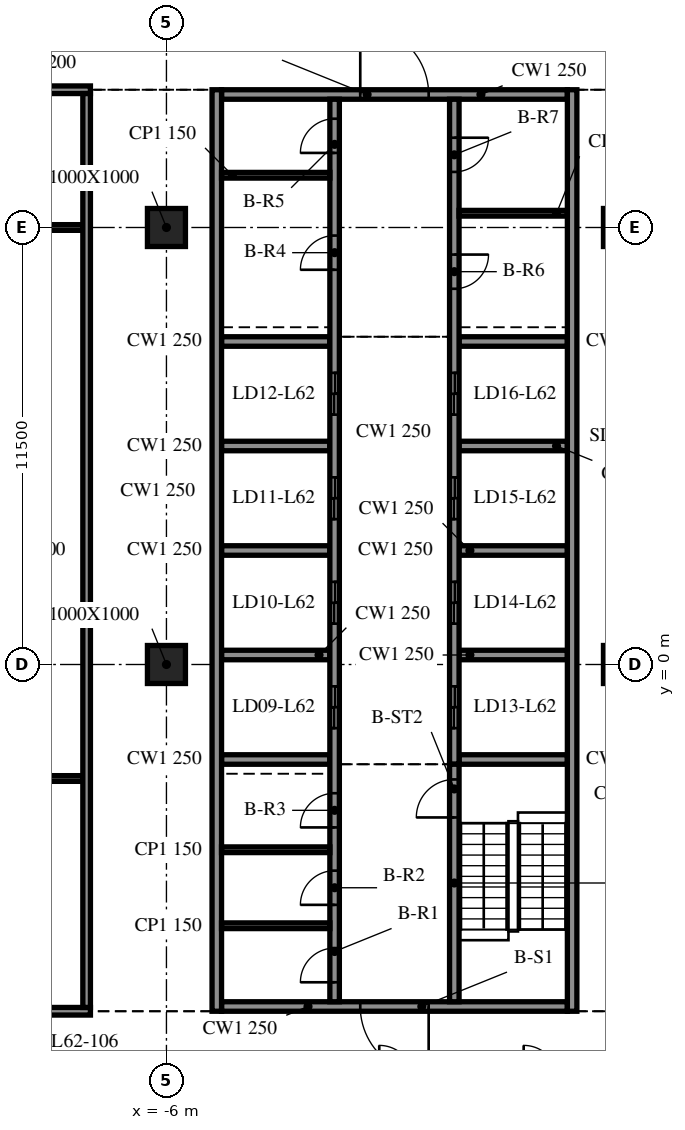
"""IFC4 building model, lengths in metres.
Left out: names, types, materials, properties, quantities, classifications, styles, units other than length and angle.
Written with IfcOpenShell. Run it as: python <this file> out.ifc"""

import sys

from ifc_helpers import new_model, si_unit, direction, frame, frame_2d, origin, origin_2d, place, context, subcontext, project, spatial, rectangle, extrude, element, fill, save


model = new_model("IFC4")
c1 = context("Model", 3, precision=1e-05, world=origin(), true_north=direction((0.0, 1.0)))
c2 = subcontext(c1, "Body", "Model", "MODEL_VIEW")
j1 = project(units=[si_unit("LENGTHUNIT", "METRE"), si_unit("PLANEANGLEUNIT", "RADIAN")], contexts=[c1])
p1 = place(None, origin())
s1 = spatial("IfcSite", under=j1, at=p1, CompositionType="ELEMENT")
p2 = place(p1, origin())
s2 = spatial("IfcBuilding", under=s1, at=p2, CompositionType="ELEMENT")
p3 = place(p2, frame((0.0, 0.0, 255.2)))
s3 = spatial("IfcBuildingStorey", under=s2, at=p3, CompositionType="ELEMENT", Elevation=255.2)
for number, where, z_axis, x_axis in (
    (1, (-6.0, 0.0, -0.34), (0.0, 0.0, 1.0), (1.0, 0.0, 0.0)),
    (2, (-6.0, 11.5, -0.34), (0.0, 0.0, 1.0), (1.0, 0.0, 0.0)),
    (3, (6.0, 0.0, -0.34), (0.0, 0.0, 1.0), (1.0, 0.0, 0.0)),
    (4, (6.0, 11.5, -0.34), (0.0, 0.0, 1.0), (1.0, 0.0, 0.0)),
):
    element("IfcColumn", number, at=place(p3, frame(where, z_axis=z_axis, x_axis=x_axis)), inside=s3, PredefinedType="COLUMN", context=c2, shape_type="SweptSolid", body=[
        extrude(rectangle(XDim=1.0, YDim=1.0, at=origin_2d()), origin(), (0.0, 0.0, 1.0), 3.74),
    ])
for number, where, z_axis, x_axis in (
    (5, (-4.675, 15.125, 0.0), (0.0, 0.0, 1.0), (0.0, -1.0, 0.0)),
    (6, (4.675, -9.125, 0.0), (0.0, 0.0, 1.0), (0.0, 1.0, 0.0)),
):
    element("IfcWall", number, at=place(p3, frame(where, z_axis=z_axis, x_axis=x_axis)), inside=s3, PredefinedType="SOLIDWALL", context=c2, shape_type="SweptSolid", body=[
        extrude(rectangle(XDim=24.25, YDim=0.25, at=frame_2d((12.125, 0.0))), origin(), (0.0, 0.0, 1.0), 3.4),
    ])
p4 = place(p3, frame((4.55, -9.0, 0.0), z_axis=(0.0, 0.0, 1.0), x_axis=(-1.0, 0.0, 0.0)))
e7 = element("IfcWall", 7, at=p4, inside=s3, PredefinedType="SOLIDWALL", context=c2, shape_type="SweptSolid", body=[
    extrude(rectangle(XDim=9.1, YDim=0.25, at=frame_2d((4.55, 0.0))), origin(), (0.0, 0.0, 1.0), 3.4),
])
p5 = place(p4, frame((3.65, 0.0, 0.0)))
e8 = element("IfcOpeningElement", 8, at=p5, cuts=e7, PredefinedType="OPENING", context=c2, shape_type="SweptSolid", body=[
    extrude(rectangle(XDim=1.8, YDim=2.1, at=frame_2d((0.9, 1.05))), frame((0.0, 0.135, 0.0), z_axis=(0.0, -1.0, 0.0), x_axis=(1.0, 0.0, 0.0)), (0.0, 0.0, 1.0), 0.27),
])
p6 = place(p3, frame((-4.55, 15.0, 0.0), z_axis=(0.0, 0.0, 1.0), x_axis=(1.0, 0.0, 0.0)))
e9 = element("IfcWall", 9, at=p6, inside=s3, PredefinedType="SOLIDWALL", context=c2, shape_type="SweptSolid", body=[
    extrude(rectangle(XDim=9.1, YDim=0.25, at=frame_2d((4.55, 0.0))), origin(), (0.0, 0.0, 1.0), 3.4),
])
p7 = place(p6, frame((3.65, 0.0, 0.0)))
e10 = element("IfcOpeningElement", 10, at=p7, cuts=e9, PredefinedType="OPENING", context=c2, shape_type="SweptSolid", body=[
    extrude(rectangle(XDim=1.8, YDim=2.1, at=frame_2d((0.9, 1.05))), frame((0.0, 0.135, 0.0), z_axis=(0.0, -1.0, 0.0), x_axis=(1.0, 0.0, 0.0)), (0.0, 0.0, 1.0), 0.27),
])
p8 = place(p3, frame((-1.575, -8.875, 0.0), z_axis=(0.0, 0.0, 1.0), x_axis=(0.0, 1.0, 0.0)))
e11 = element("IfcWall", 11, at=p8, inside=s3, PredefinedType="SOLIDWALL", context=c2, shape_type="SweptSolid", body=[
    extrude(rectangle(XDim=23.75, YDim=0.25, at=frame_2d((11.875, 0.0))), origin(), (0.0, 0.0, 1.0), 3.4),
])
p9 = place(p8, frame((7.2, 0.0, 0.0)))
e12 = element("IfcOpeningElement", 12, at=p9, cuts=e11, PredefinedType="OPENING", context=c2, shape_type="SweptSolid", body=[
    extrude(rectangle(XDim=1.1, YDim=2.1, at=frame_2d((0.55, 1.05))), frame((0.0, 0.135, 0.0), z_axis=(0.0, -1.0, 0.0), x_axis=(1.0, 0.0, 0.0)), (0.0, 0.0, 1.0), 0.27),
])
p10 = place(p8, frame((9.95, 0.0, 0.0)))
e13 = element("IfcOpeningElement", 13, at=p10, cuts=e11, PredefinedType="OPENING", context=c2, shape_type="SweptSolid", body=[
    extrude(rectangle(XDim=1.1, YDim=2.1, at=frame_2d((0.55, 1.05))), frame((0.0, 0.135, 0.0), z_axis=(0.0, -1.0, 0.0), x_axis=(1.0, 0.0, 0.0)), (0.0, 0.0, 1.0), 0.27),
])
p11 = place(p8, frame((12.7, 0.0, 0.0)))
e14 = element("IfcOpeningElement", 14, at=p11, cuts=e11, PredefinedType="OPENING", context=c2, shape_type="SweptSolid", body=[
    extrude(rectangle(XDim=1.1, YDim=2.1, at=frame_2d((0.55, 1.05))), frame((0.0, 0.135, 0.0), z_axis=(0.0, -1.0, 0.0), x_axis=(1.0, 0.0, 0.0)), (0.0, 0.0, 1.0), 0.27),
])
p12 = place(p8, frame((15.45, 0.0, 0.0)))
e15 = element("IfcOpeningElement", 15, at=p12, cuts=e11, PredefinedType="OPENING", context=c2, shape_type="SweptSolid", body=[
    extrude(rectangle(XDim=1.1, YDim=2.1, at=frame_2d((0.55, 1.05))), frame((0.0, 0.135, 0.0), z_axis=(0.0, -1.0, 0.0), x_axis=(1.0, 0.0, 0.0)), (0.0, 0.0, 1.0), 0.27),
])
p13 = place(p8, frame((0.512, 0.0, 0.0)))
e16 = element("IfcOpeningElement", 16, at=p13, cuts=e11, PredefinedType="OPENING", context=c2, shape_type="SweptSolid", body=[
    extrude(rectangle(XDim=0.9, YDim=2.1, at=frame_2d((0.45, 1.05))), frame((0.0, 0.135, 0.0), z_axis=(0.0, -1.0, 0.0), x_axis=(1.0, 0.0, 0.0)), (0.0, 0.0, 1.0), 0.27),
])
p14 = place(p8, frame((2.55, 0.0, 0.0)))
e17 = element("IfcOpeningElement", 17, at=p14, cuts=e11, PredefinedType="OPENING", context=c2, shape_type="SweptSolid", body=[
    extrude(rectangle(XDim=0.9, YDim=2.1, at=frame_2d((0.45, 1.05))), frame((0.0, 0.135, 0.0), z_axis=(0.0, -1.0, 0.0), x_axis=(1.0, 0.0, 0.0)), (0.0, 0.0, 1.0), 0.27),
])
p15 = place(p8, frame((4.587, 0.0, 0.0)))
e18 = element("IfcOpeningElement", 18, at=p15, cuts=e11, PredefinedType="OPENING", context=c2, shape_type="SweptSolid", body=[
    extrude(rectangle(XDim=0.9, YDim=2.1, at=frame_2d((0.45, 1.05))), frame((0.0, 0.135, 0.0), z_axis=(0.0, -1.0, 0.0), x_axis=(1.0, 0.0, 0.0)), (0.0, 0.0, 1.0), 0.27),
])
p16 = place(p8, frame((19.262, 0.0, 0.0)))
e19 = element("IfcOpeningElement", 19, at=p16, cuts=e11, PredefinedType="OPENING", context=c2, shape_type="SweptSolid", body=[
    extrude(rectangle(XDim=0.9, YDim=2.1, at=frame_2d((0.45, 1.05))), frame((0.0, 0.135, 0.0), z_axis=(0.0, -1.0, 0.0), x_axis=(1.0, 0.0, 0.0)), (0.0, 0.0, 1.0), 0.27),
])
p17 = place(p8, frame((22.337, 0.0, 0.0)))
e20 = element("IfcOpeningElement", 20, at=p17, cuts=e11, PredefinedType="OPENING", context=c2, shape_type="SweptSolid", body=[
    extrude(rectangle(XDim=0.9, YDim=2.1, at=frame_2d((0.45, 1.05))), frame((0.0, 0.135, 0.0), z_axis=(0.0, -1.0, 0.0), x_axis=(1.0, 0.0, 0.0)), (0.0, 0.0, 1.0), 0.27),
])
p18 = place(p3, frame((1.575, -8.875, 0.0), z_axis=(0.0, 0.0, 1.0), x_axis=(0.0, 1.0, 0.0)))
e21 = element("IfcWall", 21, at=p18, inside=s3, PredefinedType="SOLIDWALL", context=c2, shape_type="SweptSolid", body=[
    extrude(rectangle(XDim=6.25, YDim=0.25, at=frame_2d((3.125, 0.0))), origin(), (0.0, 0.0, 1.0), 3.4),
])
p19 = place(p18, frame((4.85, 0.0, 0.0)))
e22 = element("IfcOpeningElement", 22, at=p19, cuts=e21, PredefinedType="OPENING", context=c2, shape_type="SweptSolid", body=[
    extrude(rectangle(XDim=1.0, YDim=2.1, at=frame_2d((0.5, 1.05))), frame((0.0, 0.135, 0.0), z_axis=(0.0, -1.0, 0.0), x_axis=(1.0, 0.0, 0.0)), (0.0, 0.0, 1.0), 0.27),
])
p20 = place(p3, frame((1.575, 14.875, 0.0), z_axis=(0.0, 0.0, 1.0), x_axis=(0.0, -1.0, 0.0)))
e23 = element("IfcWall", 23, at=p20, inside=s3, PredefinedType="SOLIDWALL", context=c2, shape_type="SweptSolid", body=[
    extrude(rectangle(XDim=17.5, YDim=0.25, at=frame_2d((8.75, 0.0))), origin(), (0.0, 0.0, 1.0), 3.4),
])
p21 = place(p20, frame((15.45, 0.0, 0.0)))
e24 = element("IfcOpeningElement", 24, at=p21, cuts=e23, PredefinedType="OPENING", context=c2, shape_type="SweptSolid", body=[
    extrude(rectangle(XDim=1.1, YDim=2.1, at=frame_2d((0.55, 1.05))), frame((0.0, 0.135, 0.0), z_axis=(0.0, -1.0, 0.0), x_axis=(1.0, 0.0, 0.0)), (0.0, 0.0, 1.0), 0.27),
])
p22 = place(p20, frame((12.7, 0.0, 0.0)))
e25 = element("IfcOpeningElement", 25, at=p22, cuts=e23, PredefinedType="OPENING", context=c2, shape_type="SweptSolid", body=[
    extrude(rectangle(XDim=1.1, YDim=2.1, at=frame_2d((0.55, 1.05))), frame((0.0, 0.135, 0.0), z_axis=(0.0, -1.0, 0.0), x_axis=(1.0, 0.0, 0.0)), (0.0, 0.0, 1.0), 0.27),
])
p23 = place(p20, frame((9.95, 0.0, 0.0)))
e26 = element("IfcOpeningElement", 26, at=p23, cuts=e23, PredefinedType="OPENING", context=c2, shape_type="SweptSolid", body=[
    extrude(rectangle(XDim=1.1, YDim=2.1, at=frame_2d((0.55, 1.05))), frame((0.0, 0.135, 0.0), z_axis=(0.0, -1.0, 0.0), x_axis=(1.0, 0.0, 0.0)), (0.0, 0.0, 1.0), 0.27),
])
p24 = place(p20, frame((7.2, 0.0, 0.0)))
e27 = element("IfcOpeningElement", 27, at=p24, cuts=e23, PredefinedType="OPENING", context=c2, shape_type="SweptSolid", body=[
    extrude(rectangle(XDim=1.1, YDim=2.1, at=frame_2d((0.55, 1.05))), frame((0.0, 0.135, 0.0), z_axis=(0.0, -1.0, 0.0), x_axis=(1.0, 0.0, 0.0)), (0.0, 0.0, 1.0), 0.27),
])
p25 = place(p20, frame((4.087, 0.0, 0.0)))
e28 = element("IfcOpeningElement", 28, at=p25, cuts=e23, PredefinedType="OPENING", context=c2, shape_type="SweptSolid", body=[
    extrude(rectangle(XDim=0.9, YDim=2.1, at=frame_2d((0.45, 1.05))), frame((0.0, 0.135, 0.0), z_axis=(0.0, -1.0, 0.0), x_axis=(1.0, 0.0, 0.0)), (0.0, 0.0, 1.0), 0.27),
])
p26 = place(p20, frame((1.012, 0.0, 0.0)))
e29 = element("IfcOpeningElement", 29, at=p26, cuts=e23, PredefinedType="OPENING", context=c2, shape_type="SweptSolid", body=[
    extrude(rectangle(XDim=0.9, YDim=2.1, at=frame_2d((0.45, 1.05))), frame((0.0, 0.135, 0.0), z_axis=(0.0, -1.0, 0.0), x_axis=(1.0, 0.0, 0.0)), (0.0, 0.0, 1.0), 0.27),
])
for number, where, z_axis, x_axis in (
    (30, (-4.55, -2.5, 0.0), (0.0, 0.0, 1.0), (1.0, 0.0, 0.0)),
    (31, (-4.55, 0.25, 0.0), (0.0, 0.0, 1.0), (1.0, 0.0, 0.0)),
    (32, (-4.55, 3.0, 0.0), (0.0, 0.0, 1.0), (1.0, 0.0, 0.0)),
    (33, (-4.55, 5.75, 0.0), (0.0, 0.0, 1.0), (1.0, 0.0, 0.0)),
    (34, (-4.55, 8.5, 0.0), (0.0, 0.0, 1.0), (1.0, 0.0, 0.0)),
    (35, (1.7, -2.5, 0.0), (0.0, 0.0, 1.0), (1.0, 0.0, 0.0)),
    (36, (1.7, 0.25, 0.0), (0.0, 0.0, 1.0), (1.0, 0.0, 0.0)),
    (37, (1.7, 3.0, 0.0), (0.0, 0.0, 1.0), (1.0, 0.0, 0.0)),
    (38, (1.7, 5.75, 0.0), (0.0, 0.0, 1.0), (1.0, 0.0, 0.0)),
    (39, (1.7, 8.5, 0.0), (0.0, 0.0, 1.0), (1.0, 0.0, 0.0)),
):
    element("IfcWall", number, at=place(p3, frame(where, z_axis=z_axis, x_axis=x_axis)), inside=s3, PredefinedType="SOLIDWALL", context=c2, shape_type="SweptSolid", body=[
        extrude(rectangle(XDim=2.85, YDim=0.25, at=frame_2d((1.425, 0.0))), origin(), (0.0, 0.0, 1.0), 3.4),
    ])
for number, where, z_axis, x_axis in (
    (40, (-4.55, -6.875, 0.0), (0.0, 0.0, 1.0), (1.0, 0.0, 0.0)),
    (41, (-4.55, -4.875, 0.0), (0.0, 0.0, 1.0), (1.0, 0.0, 0.0)),
    (42, (-4.55, 12.875, 0.0), (0.0, 0.0, 1.0), (1.0, 0.0, 0.0)),
    (43, (1.7, 11.875, 0.0), (0.0, 0.0, 1.0), (1.0, 0.0, 0.0)),
):
    element("IfcWall", number, at=place(p3, frame(where, z_axis=z_axis, x_axis=x_axis)), inside=s3, PredefinedType="PARTITIONING", context=c2, shape_type="SweptSolid", body=[
        extrude(rectangle(XDim=2.85, YDim=0.15, at=frame_2d((1.425, 0.0))), origin(), (0.0, 0.0, 1.0), 3.4),
    ])
p27 = place(p3, frame((-16.1, -9.125, 0.0), z_axis=(0.0, 0.0, 1.0), x_axis=(1.0, 0.0, 0.0)))
e44 = element("IfcWall", 44, at=p27, inside=s3, PredefinedType="PARTITIONING", context=c2, shape_type="SweptSolid", body=[
    extrude(rectangle(XDim=8.1, YDim=0.2, at=frame_2d((4.05, 0.0))), origin(), (0.0, 0.0, 1.0), 3.4),
])
p28 = place(p27, frame((3.5, 0.0, 0.0)))
e45 = element("IfcOpeningElement", 45, at=p28, cuts=e44, PredefinedType="OPENING", context=c2, shape_type="SweptSolid", body=[
    extrude(rectangle(XDim=0.9, YDim=2.1, at=frame_2d((0.45, 1.05))), frame((0.0, 0.11, 0.0), z_axis=(0.0, -1.0, 0.0), x_axis=(1.0, 0.0, 0.0)), (0.0, 0.0, 1.0), 0.22),
])
for number, where, z_axis, x_axis in (
    (46, (-15.9, -3.0, 0.0), (0.0, 0.0, 1.0), (1.0, 0.0, 0.0)),
    (47, (-15.9, 11.5, 0.0), (0.0, 0.0, 1.0), (1.0, 0.0, 0.0)),
):
    element("IfcWall", number, at=place(p3, frame(where, z_axis=z_axis, x_axis=x_axis)), inside=s3, PredefinedType="PARTITIONING", context=c2, shape_type="SweptSolid", body=[
        extrude(rectangle(XDim=7.7, YDim=0.15, at=frame_2d((3.85, 0.0))), origin(), (0.0, 0.0, 1.0), 3.4),
    ])
p29 = place(p3, frame((-16.1, 15.125, 0.0), z_axis=(0.0, 0.0, 1.0), x_axis=(1.0, 0.0, 0.0)))
e48 = element("IfcWall", 48, at=p29, inside=s3, PredefinedType="PARTITIONING", context=c2, shape_type="SweptSolid", body=[
    extrude(rectangle(XDim=8.1, YDim=0.2, at=frame_2d((4.05, 0.0))), origin(), (0.0, 0.0, 1.0), 3.4),
])
p30 = place(p29, frame((3.5, 0.0, 0.0)))
e49 = element("IfcOpeningElement", 49, at=p30, cuts=e48, PredefinedType="OPENING", context=c2, shape_type="SweptSolid", body=[
    extrude(rectangle(XDim=0.9, YDim=2.1, at=frame_2d((0.45, 1.05))), frame((0.0, 0.11, 0.0), z_axis=(0.0, -1.0, 0.0), x_axis=(1.0, 0.0, 0.0)), (0.0, 0.0, 1.0), 0.22),
])
p31 = place(p3, frame((-8.1, -9.025, 0.0), z_axis=(0.0, 0.0, 1.0), x_axis=(0.0, 1.0, 0.0)))
e50 = element("IfcWall", 50, at=p31, inside=s3, PredefinedType="PARTITIONING", context=c2, shape_type="SweptSolid", body=[
    extrude(rectangle(XDim=24.05, YDim=0.2, at=frame_2d((12.025, 0.0))), origin(), (0.0, 0.0, 1.0), 3.4),
])
p32 = place(p5, origin())
e51 = element("IfcDoor", 51, at=p32, inside=s3, OperationType="DOUBLE_DOOR_SINGLE_SWING", PredefinedType="DOOR", context=c2, shape_type="SweptSolid", body=[
    extrude(rectangle(XDim=1.8, YDim=2.1, at=frame_2d((0.9, 1.05))), frame((0.0, 0.025, 0.0), z_axis=(0.0, -1.0, 0.0), x_axis=(1.0, 0.0, 0.0)), (0.0, 0.0, 1.0), 0.05),
])
fill(e8, e51)
p33 = place(p7, origin())
e52 = element("IfcDoor", 52, at=p33, inside=s3, OperationType="DOUBLE_DOOR_SINGLE_SWING", PredefinedType="DOOR", context=c2, shape_type="SweptSolid", body=[
    extrude(rectangle(XDim=1.8, YDim=2.1, at=frame_2d((0.9, 1.05))), frame((0.0, 0.025, 0.0), z_axis=(0.0, -1.0, 0.0), x_axis=(1.0, 0.0, 0.0)), (0.0, 0.0, 1.0), 0.05),
])
fill(e10, e52)
p34 = place(p21, origin())
e53 = element("IfcDoor", 53, at=p34, inside=s3, OperationType="DOUBLE_DOOR_SLIDING", PredefinedType="DOOR", context=c2, shape_type="SweptSolid", body=[
    extrude(rectangle(XDim=1.1, YDim=2.1, at=frame_2d((0.55, 1.05))), frame((0.0, 0.025, 0.0), z_axis=(0.0, -1.0, 0.0), x_axis=(1.0, 0.0, 0.0)), (0.0, 0.0, 1.0), 0.05),
])
fill(e24, e53)
p35 = place(p22, origin())
e54 = element("IfcDoor", 54, at=p35, inside=s3, OperationType="DOUBLE_DOOR_SLIDING", PredefinedType="DOOR", context=c2, shape_type="SweptSolid", body=[
    extrude(rectangle(XDim=1.1, YDim=2.1, at=frame_2d((0.55, 1.05))), frame((0.0, 0.025, 0.0), z_axis=(0.0, -1.0, 0.0), x_axis=(1.0, 0.0, 0.0)), (0.0, 0.0, 1.0), 0.05),
])
fill(e25, e54)
p36 = place(p23, origin())
e55 = element("IfcDoor", 55, at=p36, inside=s3, OperationType="DOUBLE_DOOR_SLIDING", PredefinedType="DOOR", context=c2, shape_type="SweptSolid", body=[
    extrude(rectangle(XDim=1.1, YDim=2.1, at=frame_2d((0.55, 1.05))), frame((0.0, 0.025, 0.0), z_axis=(0.0, -1.0, 0.0), x_axis=(1.0, 0.0, 0.0)), (0.0, 0.0, 1.0), 0.05),
])
fill(e26, e55)
p37 = place(p24, origin())
e56 = element("IfcDoor", 56, at=p37, inside=s3, OperationType="DOUBLE_DOOR_SLIDING", PredefinedType="DOOR", context=c2, shape_type="SweptSolid", body=[
    extrude(rectangle(XDim=1.1, YDim=2.1, at=frame_2d((0.55, 1.05))), frame((0.0, 0.025, 0.0), z_axis=(0.0, -1.0, 0.0), x_axis=(1.0, 0.0, 0.0)), (0.0, 0.0, 1.0), 0.05),
])
fill(e27, e56)
p38 = place(p9, origin())
e57 = element("IfcDoor", 57, at=p38, inside=s3, OperationType="DOUBLE_DOOR_SLIDING", PredefinedType="DOOR", context=c2, shape_type="SweptSolid", body=[
    extrude(rectangle(XDim=1.1, YDim=2.1, at=frame_2d((0.55, 1.05))), frame((0.0, 0.025, 0.0), z_axis=(0.0, -1.0, 0.0), x_axis=(1.0, 0.0, 0.0)), (0.0, 0.0, 1.0), 0.05),
])
fill(e12, e57)
p39 = place(p10, origin())
e58 = element("IfcDoor", 58, at=p39, inside=s3, OperationType="DOUBLE_DOOR_SLIDING", PredefinedType="DOOR", context=c2, shape_type="SweptSolid", body=[
    extrude(rectangle(XDim=1.1, YDim=2.1, at=frame_2d((0.55, 1.05))), frame((0.0, 0.025, 0.0), z_axis=(0.0, -1.0, 0.0), x_axis=(1.0, 0.0, 0.0)), (0.0, 0.0, 1.0), 0.05),
])
fill(e13, e58)
p40 = place(p11, origin())
e59 = element("IfcDoor", 59, at=p40, inside=s3, OperationType="DOUBLE_DOOR_SLIDING", PredefinedType="DOOR", context=c2, shape_type="SweptSolid", body=[
    extrude(rectangle(XDim=1.1, YDim=2.1, at=frame_2d((0.55, 1.05))), frame((0.0, 0.025, 0.0), z_axis=(0.0, -1.0, 0.0), x_axis=(1.0, 0.0, 0.0)), (0.0, 0.0, 1.0), 0.05),
])
fill(e14, e59)
p41 = place(p12, origin())
e60 = element("IfcDoor", 60, at=p41, inside=s3, OperationType="DOUBLE_DOOR_SLIDING", PredefinedType="DOOR", context=c2, shape_type="SweptSolid", body=[
    extrude(rectangle(XDim=1.1, YDim=2.1, at=frame_2d((0.55, 1.05))), frame((0.0, 0.025, 0.0), z_axis=(0.0, -1.0, 0.0), x_axis=(1.0, 0.0, 0.0)), (0.0, 0.0, 1.0), 0.05),
])
fill(e15, e60)
p42 = place(p13, origin())
e61 = element("IfcDoor", 61, at=p42, inside=s3, OperationType="SINGLE_SWING_LEFT", PredefinedType="DOOR", context=c2, shape_type="SweptSolid", body=[
    extrude(rectangle(XDim=0.9, YDim=2.1, at=frame_2d((0.45, 1.05))), frame((0.0, 0.025, 0.0), z_axis=(0.0, -1.0, 0.0), x_axis=(1.0, 0.0, 0.0)), (0.0, 0.0, 1.0), 0.05),
])
fill(e16, e61)
p43 = place(p14, origin())
e62 = element("IfcDoor", 62, at=p43, inside=s3, OperationType="SINGLE_SWING_RIGHT", PredefinedType="DOOR", context=c2, shape_type="SweptSolid", body=[
    extrude(rectangle(XDim=0.9, YDim=2.1, at=frame_2d((0.45, 1.05))), frame((0.0, 0.025, 0.0), z_axis=(0.0, -1.0, 0.0), x_axis=(1.0, 0.0, 0.0)), (0.0, 0.0, 1.0), 0.05),
])
fill(e17, e62)
p44 = place(p15, origin())
e63 = element("IfcDoor", 63, at=p44, inside=s3, OperationType="SINGLE_SWING_LEFT", PredefinedType="DOOR", context=c2, shape_type="SweptSolid", body=[
    extrude(rectangle(XDim=0.9, YDim=2.1, at=frame_2d((0.45, 1.05))), frame((0.0, 0.025, 0.0), z_axis=(0.0, -1.0, 0.0), x_axis=(1.0, 0.0, 0.0)), (0.0, 0.0, 1.0), 0.05),
])
fill(e18, e63)
p45 = place(p16, origin())
e64 = element("IfcDoor", 64, at=p45, inside=s3, OperationType="SINGLE_SWING_RIGHT", PredefinedType="DOOR", context=c2, shape_type="SweptSolid", body=[
    extrude(rectangle(XDim=0.9, YDim=2.1, at=frame_2d((0.45, 1.05))), frame((0.0, 0.025, 0.0), z_axis=(0.0, -1.0, 0.0), x_axis=(1.0, 0.0, 0.0)), (0.0, 0.0, 1.0), 0.05),
])
fill(e19, e64)
p46 = place(p17, origin())
e65 = element("IfcDoor", 65, at=p46, inside=s3, OperationType="SINGLE_SWING_LEFT", PredefinedType="DOOR", context=c2, shape_type="SweptSolid", body=[
    extrude(rectangle(XDim=0.9, YDim=2.1, at=frame_2d((0.45, 1.05))), frame((0.0, 0.025, 0.0), z_axis=(0.0, -1.0, 0.0), x_axis=(1.0, 0.0, 0.0)), (0.0, 0.0, 1.0), 0.05),
])
fill(e20, e65)
p47 = place(p25, origin())
e66 = element("IfcDoor", 66, at=p47, inside=s3, OperationType="SINGLE_SWING_RIGHT", PredefinedType="DOOR", context=c2, shape_type="SweptSolid", body=[
    extrude(rectangle(XDim=0.9, YDim=2.1, at=frame_2d((0.45, 1.05))), frame((0.0, 0.025, 0.0), z_axis=(0.0, -1.0, 0.0), x_axis=(1.0, 0.0, 0.0)), (0.0, 0.0, 1.0), 0.05),
])
fill(e28, e66)
p48 = place(p26, origin())
e67 = element("IfcDoor", 67, at=p48, inside=s3, OperationType="SINGLE_SWING_LEFT", PredefinedType="DOOR", context=c2, shape_type="SweptSolid", body=[
    extrude(rectangle(XDim=0.9, YDim=2.1, at=frame_2d((0.45, 1.05))), frame((0.0, 0.025, 0.0), z_axis=(0.0, -1.0, 0.0), x_axis=(1.0, 0.0, 0.0)), (0.0, 0.0, 1.0), 0.05),
])
fill(e29, e67)
p49 = place(p19, origin())
e68 = element("IfcDoor", 68, at=p49, inside=s3, OperationType="SINGLE_SWING_RIGHT", PredefinedType="DOOR", context=c2, shape_type="SweptSolid", body=[
    extrude(rectangle(XDim=1.0, YDim=2.1, at=frame_2d((0.5, 1.05))), frame((0.0, 0.025, 0.0), z_axis=(0.0, -1.0, 0.0), x_axis=(1.0, 0.0, 0.0)), (0.0, 0.0, 1.0), 0.05),
])
fill(e22, e68)
save(model, sys.argv[1])
